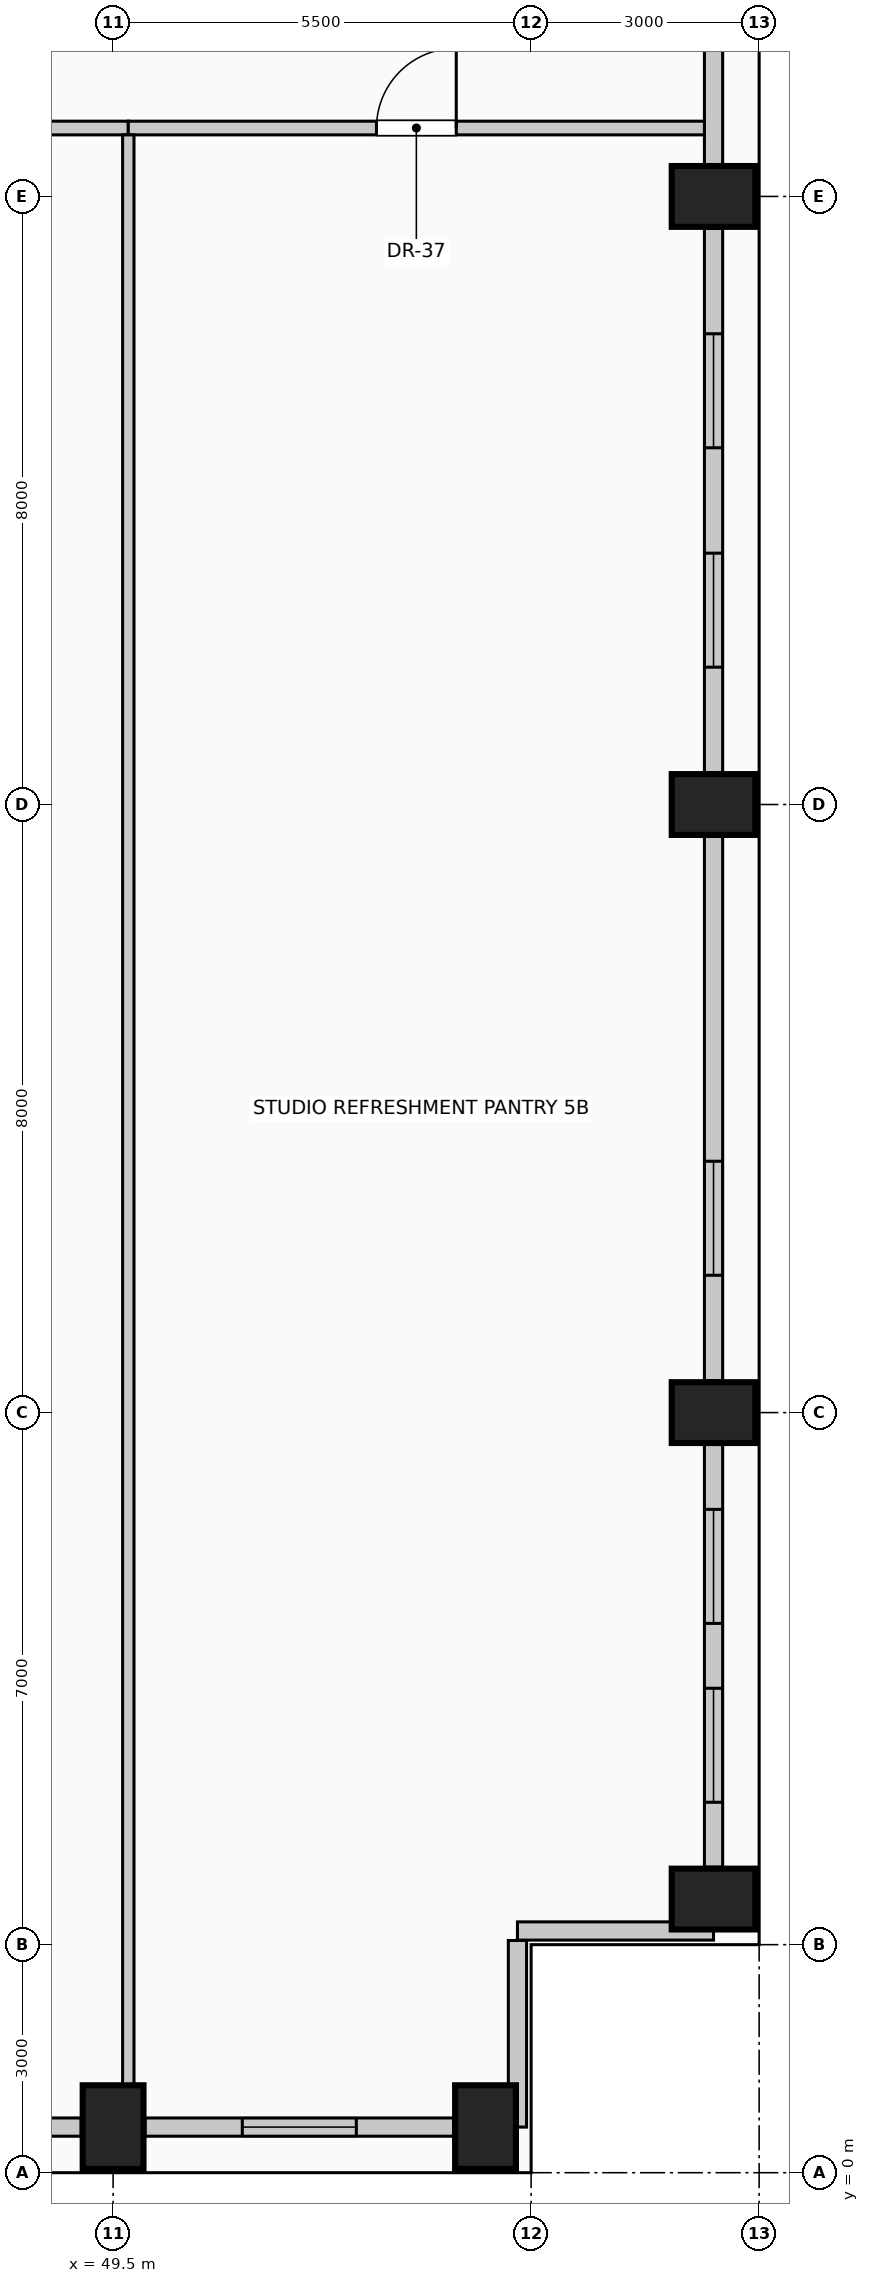
"""IFC4 building model, lengths in metres.
Left out: names, types, materials, properties, quantities, classifications, styles, units other than length and angle.
Written with IfcOpenShell. Run it as: python <this file> out.ifc"""

import sys

from ifc_helpers import new_model, si_unit, direction, frame, frame_2d, origin, origin_2d, place, context, subcontext, project, spatial, rectangle, extrude, element, fill, save


model = new_model("IFC4")
c1 = context("Model", 3, precision=1e-05, world=origin(), true_north=direction((0.0, 1.0)))
c2 = subcontext(c1, "Body", "Model", "MODEL_VIEW")
j1 = project(units=[si_unit("LENGTHUNIT", "METRE"), si_unit("PLANEANGLEUNIT", "RADIAN")], contexts=[c1])
p1 = place(None, origin())
s1 = spatial("IfcSite", under=j1, at=p1, CompositionType="ELEMENT")
p2 = place(p1, origin())
s2 = spatial("IfcBuilding", under=s1, at=p2, CompositionType="ELEMENT")
p3 = place(p2, frame((0.0, 0.0, 170.6)))
s3 = spatial("IfcBuildingStorey", under=s2, at=p3, CompositionType="ELEMENT", Elevation=170.6)
for number, where, z_axis, x_axis in (
    (1, (49.5, 0.6, 0.0), (0.0, 0.0, 1.0), (1.0, 0.0, 0.0)),
    (2, (54.4, 0.6, 0.0), (0.0, 0.0, 1.0), (1.0, 0.0, 0.0)),
    (3, (57.4, 3.6, 0.0), (0.0, 0.0, 1.0), (0.0, 1.0, 0.0)),
    (4, (57.4, 10.0, 0.0), (0.0, 0.0, 1.0), (0.0, 1.0, 0.0)),
    (5, (57.4, 18.0, 0.0), (0.0, 0.0, 1.0), (0.0, 1.0, 0.0)),
    (6, (57.4, 26.0, 0.0), (0.0, 0.0, 1.0), (0.0, 1.0, 0.0)),
):
    element("IfcColumn", number, at=place(p3, frame(where, z_axis=z_axis, x_axis=x_axis)), inside=s3, PredefinedType="COLUMN", context=c2, shape_type="SweptSolid", body=[
        extrude(rectangle(XDim=0.8, YDim=1.1, at=origin_2d()), origin(), (0.0, 0.0, 1.0), 4.0),
    ])
p4 = place(p3, frame((49.08, 0.6, 0.0), z_axis=(0.0, 0.0, 1.0), x_axis=(-1.0, 0.0, 0.0)))
e7 = element("IfcWall", 7, at=p4, inside=s3, PredefinedType="SOLIDWALL", context=c2, shape_type="SweptSolid", body=[
    extrude(rectangle(XDim=4.66, YDim=0.24, at=frame_2d((2.33, 0.0))), origin(), (0.0, 0.0, 1.0), 2.975),
])
p5 = place(p3, frame((53.98, 0.6, 0.0), z_axis=(0.0, 0.0, 1.0), x_axis=(-1.0, 0.0, 0.0)))
e8 = element("IfcWall", 8, at=p5, inside=s3, PredefinedType="SOLIDWALL", context=c2, shape_type="SweptSolid", body=[
    extrude(rectangle(XDim=4.06, YDim=0.24, at=frame_2d((2.03, 0.0))), origin(), (0.0, 0.0, 1.0), 2.975),
])
p6 = place(p5, frame((1.28, 0.0, 0.42)))
e9 = element("IfcOpeningElement", 9, at=p6, cuts=e8, PredefinedType="OPENING", context=c2, shape_type="SweptSolid", body=[
    extrude(rectangle(XDim=1.5, YDim=2.2, at=frame_2d((0.75, 1.1))), frame((0.0, 0.13, 0.0), z_axis=(0.0, -1.0, 0.0), x_axis=(1.0, 0.0, 0.0)), (0.0, 0.0, 1.0), 0.26),
])
p7 = place(p3, frame((57.4, 9.58, 0.0), z_axis=(0.0, 0.0, 1.0), x_axis=(0.0, -1.0, 0.0)))
e10 = element("IfcWall", 10, at=p7, inside=s3, PredefinedType="SOLIDWALL", context=c2, shape_type="SweptSolid", body=[
    extrude(rectangle(XDim=5.56, YDim=0.24, at=frame_2d((2.78, 0.0))), origin(), (0.0, 0.0, 1.0), 2.975),
])
p8 = place(p7, frame((0.853, 0.0, 0.42)))
e11 = element("IfcOpeningElement", 11, at=p8, cuts=e10, PredefinedType="OPENING", context=c2, shape_type="SweptSolid", body=[
    extrude(rectangle(XDim=1.5, YDim=2.2, at=frame_2d((0.75, 1.1))), frame((0.0, 0.13, 0.0), z_axis=(0.0, -1.0, 0.0), x_axis=(1.0, 0.0, 0.0)), (0.0, 0.0, 1.0), 0.26),
])
p9 = place(p7, frame((3.207, 0.0, 0.42)))
e12 = element("IfcOpeningElement", 12, at=p9, cuts=e10, PredefinedType="OPENING", context=c2, shape_type="SweptSolid", body=[
    extrude(rectangle(XDim=1.5, YDim=2.2, at=frame_2d((0.75, 1.1))), frame((0.0, 0.13, 0.0), z_axis=(0.0, -1.0, 0.0), x_axis=(1.0, 0.0, 0.0)), (0.0, 0.0, 1.0), 0.26),
])
p10 = place(p3, frame((57.4, 17.58, 0.0), z_axis=(0.0, 0.0, 1.0), x_axis=(0.0, -1.0, 0.0)))
e13 = element("IfcWall", 13, at=p10, inside=s3, PredefinedType="SOLIDWALL", context=c2, shape_type="SweptSolid", body=[
    extrude(rectangle(XDim=7.16, YDim=0.24, at=frame_2d((3.58, 0.0))), origin(), (0.0, 0.0, 1.0), 2.975),
])
p11 = place(p10, frame((4.273, 0.0, 0.42)))
e14 = element("IfcOpeningElement", 14, at=p11, cuts=e13, PredefinedType="OPENING", context=c2, shape_type="SweptSolid", body=[
    extrude(rectangle(XDim=1.5, YDim=2.2, at=frame_2d((0.75, 1.1))), frame((0.0, 0.13, 0.0), z_axis=(0.0, -1.0, 0.0), x_axis=(1.0, 0.0, 0.0)), (0.0, 0.0, 1.0), 0.26),
])
p12 = place(p3, frame((57.4, 25.58, 0.0), z_axis=(0.0, 0.0, 1.0), x_axis=(0.0, -1.0, 0.0)))
e15 = element("IfcWall", 15, at=p12, inside=s3, PredefinedType="SOLIDWALL", context=c2, shape_type="SweptSolid", body=[
    extrude(rectangle(XDim=7.16, YDim=0.24, at=frame_2d((3.58, 0.0))), origin(), (0.0, 0.0, 1.0), 2.975),
])
p13 = place(p12, frame((1.387, 0.0, 0.42)))
e16 = element("IfcOpeningElement", 16, at=p13, cuts=e15, PredefinedType="OPENING", context=c2, shape_type="SweptSolid", body=[
    extrude(rectangle(XDim=1.5, YDim=2.2, at=frame_2d((0.75, 1.1))), frame((0.0, 0.13, 0.0), z_axis=(0.0, -1.0, 0.0), x_axis=(1.0, 0.0, 0.0)), (0.0, 0.0, 1.0), 0.26),
])
p14 = place(p12, frame((4.273, 0.0, 0.42)))
e17 = element("IfcOpeningElement", 17, at=p14, cuts=e15, PredefinedType="OPENING", context=c2, shape_type="SweptSolid", body=[
    extrude(rectangle(XDim=1.5, YDim=2.2, at=frame_2d((0.75, 1.1))), frame((0.0, 0.13, 0.0), z_axis=(0.0, -1.0, 0.0), x_axis=(1.0, 0.0, 0.0)), (0.0, 0.0, 1.0), 0.26),
])
p15 = place(p3, frame((57.4, 33.58, 0.0), z_axis=(0.0, 0.0, 1.0), x_axis=(0.0, -1.0, 0.0)))
e18 = element("IfcWall", 18, at=p15, inside=s3, PredefinedType="SOLIDWALL", context=c2, shape_type="SweptSolid", body=[
    extrude(rectangle(XDim=7.16, YDim=0.24, at=frame_2d((3.58, 0.0))), origin(), (0.0, 0.0, 1.0), 2.975),
])
p16 = place(p3, frame((57.4, 3.18, 0.0), z_axis=(0.0, 0.0, 1.0), x_axis=(-1.0, 0.0, 0.0)))
e19 = element("IfcWall", 19, at=p16, inside=s3, PredefinedType="SOLIDWALL", context=c2, shape_type="SweptSolid", body=[
    extrude(rectangle(XDim=2.58, YDim=0.24, at=frame_2d((1.29, 0.0))), origin(), (0.0, 0.0, 1.0), 3.725),
])
p17 = place(p3, frame((54.82, 3.055, 0.0), z_axis=(0.0, 0.0, 1.0), x_axis=(0.0, -1.0, 0.0)))
e20 = element("IfcWall", 20, at=p17, inside=s3, PredefinedType="SOLIDWALL", context=c2, shape_type="SweptSolid", body=[
    extrude(rectangle(XDim=2.455, YDim=0.24, at=frame_2d((1.228, 0.0))), origin(), (0.0, 0.0, 1.0), 3.725),
])
p18 = place(p3, frame((41.36, 26.9, 0.0), z_axis=(0.0, 0.0, 1.0), x_axis=(1.0, 0.0, 0.0)))
e21 = element("IfcWall", 21, at=p18, inside=s3, PredefinedType="PARTITIONING", context=c2, shape_type="SweptSolid", body=[
    extrude(rectangle(XDim=8.34, YDim=0.18, at=frame_2d((4.17, 0.0))), origin(), (0.0, 0.0, 1.0), 3.725),
])
p19 = place(p18, frame((3.695, 0.0, 0.0)))
e22 = element("IfcOpeningElement", 22, at=p19, cuts=e21, PredefinedType="OPENING", context=c2, shape_type="SweptSolid", body=[
    extrude(rectangle(XDim=0.95, YDim=2.15, at=frame_2d((0.475, 1.075))), frame((0.0, 0.1, 0.0), z_axis=(0.0, -1.0, 0.0), x_axis=(1.0, 0.0, 0.0)), (0.0, 0.0, 1.0), 0.2),
])
p20 = place(p3, frame((49.7, 26.9, 0.0), z_axis=(0.0, 0.0, 1.0), x_axis=(1.0, 0.0, 0.0)))
e23 = element("IfcWall", 23, at=p20, inside=s3, PredefinedType="PARTITIONING", context=c2, shape_type="SweptSolid", body=[
    extrude(rectangle(XDim=7.58, YDim=0.18, at=frame_2d((3.79, 0.0))), origin(), (0.0, 0.0, 1.0), 3.725),
])
p21 = place(p20, frame((3.265, 0.0, 0.0)))
e24 = element("IfcOpeningElement", 24, at=p21, cuts=e23, PredefinedType="OPENING", context=c2, shape_type="SweptSolid", body=[
    extrude(rectangle(XDim=1.05, YDim=2.15, at=frame_2d((0.525, 1.075))), frame((0.0, 0.1, 0.0), z_axis=(0.0, -1.0, 0.0), x_axis=(1.0, 0.0, 0.0)), (0.0, 0.0, 1.0), 0.2),
])
p22 = place(p3, frame((49.7, 1.15, 0.0), z_axis=(0.0, 0.0, 1.0), x_axis=(0.0, 1.0, 0.0)))
e25 = element("IfcWall", 25, at=p22, inside=s3, PredefinedType="PARTITIONING", context=c2, shape_type="SweptSolid", body=[
    extrude(rectangle(XDim=25.66, YDim=0.15, at=frame_2d((12.83, 0.0))), origin(), (0.0, 0.0, 1.0), 3.725),
])
p23 = place(p6, origin())
e26 = element("IfcWindow", 26, at=p23, inside=s3, PartitioningType="SINGLE_PANEL", PredefinedType="WINDOW", context=c2, shape_type="SweptSolid", body=[
    extrude(rectangle(XDim=1.5, YDim=2.2, at=frame_2d((0.75, 1.1))), frame((0.0, 0.03, 0.0), z_axis=(0.0, -1.0, 0.0), x_axis=(1.0, 0.0, 0.0)), (0.0, 0.0, 1.0), 0.06),
])
fill(e9, e26)
p24 = place(p8, origin())
e27 = element("IfcWindow", 27, at=p24, inside=s3, PartitioningType="SINGLE_PANEL", PredefinedType="WINDOW", context=c2, shape_type="SweptSolid", body=[
    extrude(rectangle(XDim=1.5, YDim=2.2, at=frame_2d((0.75, 1.1))), frame((0.0, 0.03, 0.0), z_axis=(0.0, -1.0, 0.0), x_axis=(1.0, 0.0, 0.0)), (0.0, 0.0, 1.0), 0.06),
])
fill(e11, e27)
p25 = place(p9, origin())
e28 = element("IfcWindow", 28, at=p25, inside=s3, PartitioningType="SINGLE_PANEL", PredefinedType="WINDOW", context=c2, shape_type="SweptSolid", body=[
    extrude(rectangle(XDim=1.5, YDim=2.2, at=frame_2d((0.75, 1.1))), frame((0.0, 0.03, 0.0), z_axis=(0.0, -1.0, 0.0), x_axis=(1.0, 0.0, 0.0)), (0.0, 0.0, 1.0), 0.06),
])
fill(e12, e28)
p26 = place(p11, origin())
e29 = element("IfcWindow", 29, at=p26, inside=s3, PartitioningType="SINGLE_PANEL", PredefinedType="WINDOW", context=c2, shape_type="SweptSolid", body=[
    extrude(rectangle(XDim=1.5, YDim=2.2, at=frame_2d((0.75, 1.1))), frame((0.0, 0.03, 0.0), z_axis=(0.0, -1.0, 0.0), x_axis=(1.0, 0.0, 0.0)), (0.0, 0.0, 1.0), 0.06),
])
fill(e14, e29)
p27 = place(p13, origin())
e30 = element("IfcWindow", 30, at=p27, inside=s3, PartitioningType="SINGLE_PANEL", PredefinedType="WINDOW", context=c2, shape_type="SweptSolid", body=[
    extrude(rectangle(XDim=1.5, YDim=2.2, at=frame_2d((0.75, 1.1))), frame((0.0, 0.03, 0.0), z_axis=(0.0, -1.0, 0.0), x_axis=(1.0, 0.0, 0.0)), (0.0, 0.0, 1.0), 0.06),
])
fill(e16, e30)
p28 = place(p14, origin())
e31 = element("IfcWindow", 31, at=p28, inside=s3, PartitioningType="SINGLE_PANEL", PredefinedType="WINDOW", context=c2, shape_type="SweptSolid", body=[
    extrude(rectangle(XDim=1.5, YDim=2.2, at=frame_2d((0.75, 1.1))), frame((0.0, 0.03, 0.0), z_axis=(0.0, -1.0, 0.0), x_axis=(1.0, 0.0, 0.0)), (0.0, 0.0, 1.0), 0.06),
])
fill(e17, e31)
p29 = place(p21, origin())
e32 = element("IfcDoor", 32, at=p29, inside=s3, OperationType="SINGLE_SWING_RIGHT", PredefinedType="DOOR", context=c2, shape_type="SweptSolid", body=[
    extrude(rectangle(XDim=1.05, YDim=2.15, at=frame_2d((0.525, 1.075))), frame((0.0, 0.025, 0.0), z_axis=(0.0, -1.0, 0.0), x_axis=(1.0, 0.0, 0.0)), (0.0, 0.0, 1.0), 0.05),
])
fill(e24, e32)
save(model, sys.argv[1])
